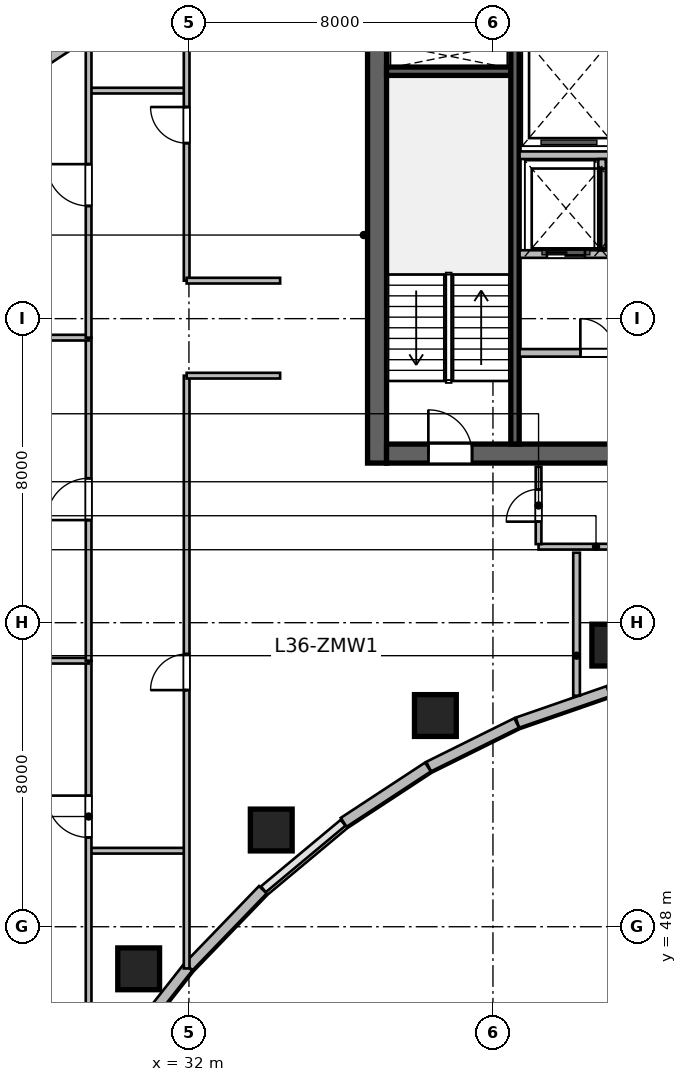
"""IFC4 building model, lengths in metres.
Left out: names, types, materials, properties, quantities, classifications, styles, units other than length and angle.
Written with IfcOpenShell. Run it as: python <this file> out.ifc"""

import sys

from ifc_helpers import new_model, si_unit, direction, frame, frame_2d, origin, origin_2d, place, context, subcontext, project, spatial, rectangle, circle, extrude, source, transform, mapped, element, fill, save


model = new_model("IFC4")
c1 = context("Model", 3, precision=1e-05, world=origin(), true_north=direction((0.0, 1.0)))
c2 = subcontext(c1, "Body", "Model", "MODEL_VIEW")
j1 = project(units=[si_unit("LENGTHUNIT", "METRE"), si_unit("PLANEANGLEUNIT", "RADIAN")], contexts=[c1])
p1 = place(None, origin())
s1 = spatial("IfcSite", under=j1, at=p1, CompositionType="ELEMENT")
p2 = place(p1, origin())
s2 = spatial("IfcBuilding", under=s1, at=p2, CompositionType="ELEMENT")
p3 = place(p2, frame((0.0, 0.0, 150.6)))
s3 = spatial("IfcBuildingStorey", under=s2, at=p3, CompositionType="ELEMENT", Elevation=150.6)
m1 = source(origin(), c2, "Body", "SweptSolid", [
    extrude(rectangle(XDim=12.0, YDim=0.5, at=frame_2d((6.0, 0.0))), origin(), (0.0, 0.0, 1.0), 3.9),
])
p4 = place(p3, frame((36.95, 60.2, 0.0), z_axis=(0.0, 0.0, 1.0), x_axis=(0.0, 1.0, 0.0)))
e1 = element("IfcWall", 1, at=p4, inside=s3, PredefinedType="SHEAR", context=c2, shape_type="MappedRepresentation", body=[
    mapped(m1, transform((0.0, 0.0, 0.0), scale=1.0)),
])
m2 = source(origin(), c2, "Body", "SweptSolid", [
    extrude(rectangle(XDim=21.6, YDim=0.5, at=frame_2d((10.8, 0.0))), origin(), (0.0, 0.0, 1.0), 3.9),
])
p5 = place(p3, frame((37.2, 60.45, 0.0), z_axis=(0.0, 0.0, 1.0), x_axis=(1.0, 0.0, 0.0)))
e2 = element("IfcWall", 2, at=p5, inside=s3, PredefinedType="SHEAR", context=c2, shape_type="MappedRepresentation", body=[
    mapped(m2, transform((0.0, 0.0, 0.0), scale=1.0)),
])
p6 = place(p5, frame((1.1, 0.0, 0.0)))
e3 = element("IfcOpeningElement", 3, at=p6, cuts=e2, PredefinedType="OPENING", context=c2, shape_type="SweptSolid", body=[
    extrude(rectangle(XDim=1.15, YDim=2.15, at=frame_2d((0.575, 1.075))), frame((0.0, 0.26, 0.0), z_axis=(0.0, -1.0, 0.0), x_axis=(1.0, 0.0, 0.0)), (0.0, 0.0, 1.0), 0.52),
])
p7 = place(p5, frame((19.5, 0.0, 0.0)))
e4 = element("IfcOpeningElement", 4, at=p7, cuts=e2, PredefinedType="OPENING", context=c2, shape_type="SweptSolid", body=[
    extrude(rectangle(XDim=0.9, YDim=2.1, at=frame_2d((0.45, 1.05))), frame((0.0, 0.26, 0.0), z_axis=(0.0, -1.0, 0.0), x_axis=(1.0, 0.0, 0.0)), (0.0, 0.0, 1.0), 0.52),
])
p8 = place(p5, frame((12.02, 0.0, 0.0)))
e5 = element("IfcOpeningElement", 5, at=p8, cuts=e2, PredefinedType="OPENING", context=c2, shape_type="SweptSolid", body=[
    extrude(rectangle(XDim=1.6, YDim=2.15, at=frame_2d((0.8, 1.075))), frame((0.0, 0.26, 0.0), z_axis=(0.0, -1.0, 0.0), x_axis=(1.0, 0.0, 0.0)), (0.0, 0.0, 1.0), 0.52),
])
m3 = source(origin(), c2, "Body", "SweptSolid", [
    extrude(rectangle(XDim=3.27, YDim=0.22, at=frame_2d((1.635, 0.0))), origin(), (0.0, 0.0, 1.0), 3.9),
])
p9 = place(p3, frame((37.2, 70.51, 0.0), z_axis=(0.0, 0.0, 1.0), x_axis=(1.0, 0.0, 0.0)))
e6 = element("IfcWall", 6, at=p9, inside=s3, PredefinedType="SHEAR", context=c2, shape_type="MappedRepresentation", body=[
    mapped(m3, transform((0.0, 0.0, 0.0), scale=1.0)),
])
m4 = source(origin(), c2, "Body", "SweptSolid", [
    extrude(rectangle(XDim=11.0, YDim=0.22, at=frame_2d((5.5, 0.0))), origin(), (0.0, 0.0, 1.0), 3.9),
])
p10 = place(p3, frame((40.58, 60.7, 0.0), z_axis=(0.0, 0.0, 1.0), x_axis=(0.0, 1.0, 0.0)))
e7 = element("IfcWall", 7, at=p10, inside=s3, PredefinedType="SHEAR", context=c2, shape_type="MappedRepresentation", body=[
    mapped(m4, transform((0.0, 0.0, 0.0), scale=1.0)),
])
m5 = source(origin(), c2, "Body", "SweptSolid", [
    extrude(circle(Radius=0.55, at=origin_2d()), origin(), (0.0, 0.0, 1.0), 3.9),
])
for number, where, z_axis, x_axis in (
    (8, (30.677, 46.892, 0.0), (0.0, 0.0, 1.0), (-0.571, 0.821, 0.0)),
    (9, (34.166, 50.545, 0.0), (0.0, 0.0, 1.0), (-0.436, 0.9, 0.0)),
    (10, (38.485, 53.558, 0.0), (0.0, 0.0, 1.0), (-0.289, 0.957, 0.0)),
    (11, (43.154, 55.411, 0.0), (0.0, 0.0, 1.0), (-0.143, 0.99, 0.0)),
):
    element("IfcColumn", number, at=place(p3, frame(where, z_axis=z_axis, x_axis=x_axis)), inside=s3, PredefinedType="COLUMN", context=c2, shape_type="MappedRepresentation", body=[
        mapped(m5, transform((0.0, 0.0, 0.0), scale=1.0)),
    ])
m6 = source(origin(), c2, "Body", "SweptSolid", [
    extrude(rectangle(XDim=2.53, YDim=0.28, at=frame_2d((1.265, 0.0))), origin(), (0.0, 0.0, 1.0), 3.65),
])
p11 = place(p3, frame((43.035, 54.198, 0.0), z_axis=(0.0, 0.0, 1.0), x_axis=(-0.944872429646, -0.327438683872, 0.0)))
e12 = element("IfcWall", 12, at=p11, inside=s3, PredefinedType="SOLIDWALL", context=c2, shape_type="MappedRepresentation", body=[
    mapped(m6, transform((0.0, 0.0, 0.0), scale=1.0)),
])
m7 = source(origin(), c2, "Body", "SweptSolid", [
    extrude(rectangle(XDim=2.584, YDim=0.28, at=frame_2d((1.292, 0.0))), origin(), (0.0, 0.0, 1.0), 3.65),
])
p12 = place(p3, frame((40.624, 53.361, 0.0), z_axis=(0.0, 0.0, 1.0), x_axis=(-0.895989792847, -0.44407464588, 0.0)))
e13 = element("IfcWall", 13, at=p12, inside=s3, PredefinedType="SOLIDWALL", context=c2, shape_type="MappedRepresentation", body=[
    mapped(m7, transform((0.0, 0.0, 0.0), scale=1.0)),
])
m8 = source(origin(), c2, "Body", "SweptSolid", [
    extrude(rectangle(XDim=2.652, YDim=0.28, at=frame_2d((1.326, 0.0))), origin(), (0.0, 0.0, 1.0), 3.65),
])
p13 = place(p3, frame((38.289, 52.202, 0.0), z_axis=(0.0, 0.0, 1.0), x_axis=(-0.836008323535, -0.54871676025, 0.0)))
e14 = element("IfcWall", 14, at=p13, inside=s3, PredefinedType="SOLIDWALL", context=c2, shape_type="MappedRepresentation", body=[
    mapped(m8, transform((0.0, 0.0, 0.0), scale=1.0)),
])
m9 = source(origin(), c2, "Body", "SweptSolid", [
    extrude(rectangle(XDim=2.812, YDim=0.28, at=frame_2d((1.406, 0.0))), origin(), (0.0, 0.0, 1.0), 3.65),
])
p14 = place(p3, frame((33.945, 48.973, 0.0), z_axis=(0.0, 0.0, 1.0), x_axis=(-0.694583668785, -0.719411931411, 0.0)))
e15 = element("IfcWall", 15, at=p14, inside=s3, PredefinedType="SOLIDWALL", context=c2, shape_type="MappedRepresentation", body=[
    mapped(m9, transform((0.0, 0.0, 0.0), scale=1.0)),
])
m10 = source(origin(), c2, "Body", "SweptSolid", [
    extrude(rectangle(XDim=2.897, YDim=0.28, at=frame_2d((1.448, 0.0))), origin(), (0.0, 0.0, 1.0), 3.65),
])
p15 = place(p3, frame((31.979, 46.936, 0.0), z_axis=(0.0, 0.0, 1.0), x_axis=(-0.618167636915, -0.786046291685, 0.0)))
e16 = element("IfcWall", 16, at=p15, inside=s3, PredefinedType="SOLIDWALL", context=c2, shape_type="MappedRepresentation", body=[
    mapped(m10, transform((0.0, 0.0, 0.0), scale=1.0)),
])
m11 = source(origin(), c2, "Body", "SweptSolid", [
    extrude(rectangle(XDim=4.501, YDim=0.28, at=frame_2d((2.25, 0.0))), origin(), (0.0, 0.0, 1.0), 3.65),
])
p16 = place(p3, frame((27.939, 70.61, 0.0), z_axis=(0.0, 0.0, 1.0), x_axis=(0.835984920737, 0.548752414391, 0.0)))
e17 = element("IfcWall", 17, at=p16, inside=s3, PredefinedType="SOLIDWALL", context=c2, shape_type="MappedRepresentation", body=[
    mapped(m11, transform((0.0, 0.0, 0.0), scale=1.0)),
])
m12 = source(origin(), c2, "Body", "SweptSolid", [
    extrude(rectangle(XDim=8.8, YDim=0.2, at=frame_2d((4.4, 0.0))), origin(), (0.0, 0.0, 1.0), 3.65),
])
p17 = place(p3, frame((40.7, 68.3, 0.0), z_axis=(0.0, 0.0, 1.0), x_axis=(1.0, 0.0, 0.0)))
e18 = element("IfcWall", 18, at=p17, inside=s3, PredefinedType="SOLIDWALL", context=c2, shape_type="MappedRepresentation", body=[
    mapped(m12, transform((0.0, 0.0, 0.0), scale=1.0)),
])
m13 = source(origin(), c2, "Body", "SweptSolid", [
    extrude(rectangle(XDim=8.02, YDim=0.2, at=frame_2d((4.01, 0.0))), origin(), (0.0, 0.0, 1.0), 3.65),
])
p18 = place(p3, frame((40.7, 63.1, 0.0), z_axis=(0.0, 0.0, 1.0), x_axis=(1.0, 0.0, 0.0)))
e19 = element("IfcWall", 19, at=p18, inside=s3, PredefinedType="SOLIDWALL", context=c2, shape_type="MappedRepresentation", body=[
    mapped(m13, transform((0.0, 0.0, 0.0), scale=1.0)),
])
p19 = place(p18, frame((1.6, 0.0, 0.0)))
e20 = element("IfcOpeningElement", 20, at=p19, cuts=e19, PredefinedType="OPENING", context=c2, shape_type="SweptSolid", body=[
    extrude(rectangle(XDim=0.9, YDim=2.1, at=frame_2d((0.45, 1.05))), frame((0.0, 0.11, 0.0), z_axis=(0.0, -1.0, 0.0), x_axis=(1.0, 0.0, 0.0)), (0.0, 0.0, 1.0), 0.22),
])
p20 = place(p18, frame((5.54, 0.0, 0.0)))
e21 = element("IfcOpeningElement", 21, at=p20, cuts=e19, PredefinedType="OPENING", context=c2, shape_type="SweptSolid", body=[
    extrude(rectangle(XDim=0.9, YDim=2.1, at=frame_2d((0.45, 1.05))), frame((0.0, 0.11, 0.0), z_axis=(0.0, -1.0, 0.0), x_axis=(1.0, 0.0, 0.0)), (0.0, 0.0, 1.0), 0.22),
])
p21 = place(p3, frame((40.7, 65.7, 0.0), z_axis=(0.0, 0.0, 1.0), x_axis=(1.0, 0.0, 0.0)))
e22 = element("IfcWall", 22, at=p21, inside=s3, PredefinedType="SOLIDWALL", context=c2, shape_type="MappedRepresentation", body=[
    mapped(m12, transform((0.0, 0.0, 0.0), scale=1.0)),
])
p22 = place(p21, frame((0.72, 0.0, 0.0)))
e23 = element("IfcOpeningElement", 23, at=p22, cuts=e22, PredefinedType="OPENING", context=c2, shape_type="SweptSolid", body=[
    extrude(rectangle(XDim=1.0, YDim=2.15, at=frame_2d((0.5, 1.075))), frame((0.0, 0.11, 0.0), z_axis=(0.0, -1.0, 0.0), x_axis=(1.0, 0.0, 0.0)), (0.0, 0.0, 1.0), 0.22),
])
p23 = place(p21, frame((2.62, 0.0, 0.0)))
e24 = element("IfcOpeningElement", 24, at=p23, cuts=e22, PredefinedType="OPENING", context=c2, shape_type="SweptSolid", body=[
    extrude(rectangle(XDim=1.0, YDim=2.15, at=frame_2d((0.5, 1.075))), frame((0.0, 0.11, 0.0), z_axis=(0.0, -1.0, 0.0), x_axis=(1.0, 0.0, 0.0)), (0.0, 0.0, 1.0), 0.22),
])
p24 = place(p21, frame((4.55, 0.0, 0.0)))
e25 = element("IfcOpeningElement", 25, at=p24, cuts=e22, PredefinedType="OPENING", context=c2, shape_type="SweptSolid", body=[
    extrude(rectangle(XDim=1.0, YDim=2.15, at=frame_2d((0.5, 1.075))), frame((0.0, 0.11, 0.0), z_axis=(0.0, -1.0, 0.0), x_axis=(1.0, 0.0, 0.0)), (0.0, 0.0, 1.0), 0.22),
])
p25 = place(p21, frame((6.55, 0.0, 0.0)))
e26 = element("IfcOpeningElement", 26, at=p25, cuts=e22, PredefinedType="OPENING", context=c2, shape_type="SweptSolid", body=[
    extrude(rectangle(XDim=1.0, YDim=2.15, at=frame_2d((0.5, 1.075))), frame((0.0, 0.11, 0.0), z_axis=(0.0, -1.0, 0.0), x_axis=(1.0, 0.0, 0.0)), (0.0, 0.0, 1.0), 0.22),
])
m14 = source(origin(), c2, "Body", "SweptSolid", [
    extrude(rectangle(XDim=2.4, YDim=0.2, at=frame_2d((1.2, 0.0))), origin(), (0.0, 0.0, 1.0), 3.65),
])
p26 = place(p3, frame((42.87, 65.8, 0.0), z_axis=(0.0, 0.0, 1.0), x_axis=(0.0, 1.0, 0.0)))
e27 = element("IfcWall", 27, at=p26, inside=s3, PredefinedType="SOLIDWALL", context=c2, shape_type="MappedRepresentation", body=[
    mapped(m14, transform((0.0, 0.0, 0.0), scale=1.0)),
])
m15 = source(origin(), c2, "Body", "SweptSolid", [
    extrude(rectangle(XDim=5.4, YDim=0.15, at=frame_2d((2.7, 0.0))), origin(), (0.0, 0.0, 1.0), 3.65),
])
p27 = place(p3, frame((41.2, 58.0, 0.0), z_axis=(0.0, 0.0, 1.0), x_axis=(1.0, 0.0, 0.0)))
e28 = element("IfcWall", 28, at=p27, inside=s3, PredefinedType="PARTITIONING", context=c2, shape_type="MappedRepresentation", body=[
    mapped(m15, transform((0.0, 0.0, 0.0), scale=1.0)),
])
p28 = place(p27, frame((2.25, 0.0, 0.0)))
e29 = element("IfcOpeningElement", 29, at=p28, cuts=e28, PredefinedType="OPENING", context=c2, shape_type="SweptSolid", body=[
    extrude(rectangle(XDim=0.9, YDim=2.08, at=frame_2d((0.45, 1.04))), frame((0.0, 0.085, 0.0), z_axis=(0.0, -1.0, 0.0), x_axis=(1.0, 0.0, 0.0)), (0.0, 0.0, 1.0), 0.17),
])
m16 = source(origin(), c2, "Body", "SweptSolid", [
    extrude(rectangle(XDim=2.033, YDim=0.15, at=frame_2d((1.016, 0.0))), origin(), (0.0, 0.0, 1.0), 3.65),
])
p29 = place(p3, frame((41.2, 58.067, 0.0), z_axis=(0.0, 0.0, 1.0), x_axis=(0.0, 1.0, 0.0)))
e30 = element("IfcWall", 30, at=p29, inside=s3, PredefinedType="PARTITIONING", context=c2, shape_type="MappedRepresentation", body=[
    mapped(m16, transform((0.0, 0.0, 0.0), scale=1.0)),
])
p30 = place(p29, frame((0.591, 0.0, 0.0)))
e31 = element("IfcOpeningElement", 31, at=p30, cuts=e30, PredefinedType="OPENING", context=c2, shape_type="SweptSolid", body=[
    extrude(rectangle(XDim=0.85, YDim=2.1, at=frame_2d((0.425, 1.05))), frame((0.0, 0.085, 0.0), z_axis=(0.0, -1.0, 0.0), x_axis=(1.0, 0.0, 0.0)), (0.0, 0.0, 1.0), 0.17),
])
m17 = source(origin(), c2, "Body", "SweptSolid", [
    extrude(rectangle(XDim=3.763, YDim=0.175, at=frame_2d((1.881, 0.0))), origin(), (0.0, 0.0, 1.0), 3.65),
])
p31 = place(p3, frame((42.2, 54.079, 0.0), z_axis=(0.0, 0.0, 1.0), x_axis=(0.0, 1.0, 0.0)))
e32 = element("IfcWall", 32, at=p31, inside=s3, PredefinedType="PARTITIONING", context=c2, shape_type="MappedRepresentation", body=[
    mapped(m17, transform((0.0, 0.0, 0.0), scale=1.0)),
])
m18 = source(origin(), c2, "Body", "SweptSolid", [
    extrude(rectangle(XDim=2.5, YDim=0.15, at=frame_2d((1.25, 0.0))), origin(), (0.0, 0.0, 1.0), 3.65),
])
for number, where, z_axis, x_axis in (
    (33, (29.4, 50.0, 0.0), (0.0, 0.0, 1.0), (1.0, 0.0, 0.0)),
    (34, (29.4, 70.0, 0.0), (0.0, 0.0, 1.0), (1.0, 0.0, 0.0)),
):
    element("IfcWall", number, at=place(p3, frame(where, z_axis=z_axis, x_axis=x_axis)), inside=s3, PredefinedType="PARTITIONING", context=c2, shape_type="MappedRepresentation", body=[
        mapped(m18, transform((0.0, 0.0, 0.0), scale=1.0)),
    ])
m19 = source(origin(), c2, "Body", "SweptSolid", [
    extrude(rectangle(XDim=11.612, YDim=0.15, at=frame_2d((5.806, 0.0))), origin(), (0.0, 0.0, 1.0), 2.942),
])
p32 = place(p3, frame((29.36, 43.388, 0.0), z_axis=(0.0, 0.0, 1.0), x_axis=(0.0, 1.0, 0.0)))
e35 = element("IfcWall", 35, at=p32, inside=s3, PredefinedType="PARTITIONING", context=c2, shape_type="MappedRepresentation", body=[
    mapped(m19, transform((0.0, 0.0, 0.0), scale=1.0)),
])
p33 = place(p32, frame((6.962, 0.0, 0.0)))
e36 = element("IfcOpeningElement", 36, at=p33, cuts=e35, PredefinedType="OPENING", context=c2, shape_type="SweptSolid", body=[
    extrude(rectangle(XDim=1.1, YDim=2.15, at=frame_2d((0.55, 1.075))), frame((0.0, 0.085, 0.0), z_axis=(0.0, -1.0, 0.0), x_axis=(1.0, 0.0, 0.0)), (0.0, 0.0, 1.0), 0.17),
])
m20 = source(origin(), c2, "Body", "SweptSolid", [
    extrude(rectangle(XDim=14.623, YDim=0.15, at=frame_2d((7.312, 0.0))), origin(), (0.0, 0.0, 1.0), 3.65),
])
p34 = place(p3, frame((14.737, 55.0, 0.0), z_axis=(0.0, 0.0, 1.0), x_axis=(1.0, 0.0, 0.0)))
e37 = element("IfcWall", 37, at=p34, inside=s3, PredefinedType="PARTITIONING", context=c2, shape_type="MappedRepresentation", body=[
    mapped(m20, transform((0.0, 0.0, 0.0), scale=1.0)),
])
m21 = source(origin(), c2, "Body", "SweptSolid", [
    extrude(rectangle(XDim=8.5, YDim=0.15, at=frame_2d((4.25, 0.0))), origin(), (0.0, 0.0, 1.0), 2.942),
])
p35 = place(p3, frame((29.36, 55.0, 0.0), z_axis=(0.0, 0.0, 1.0), x_axis=(0.0, 1.0, 0.0)))
e38 = element("IfcWall", 38, at=p35, inside=s3, PredefinedType="PARTITIONING", context=c2, shape_type="MappedRepresentation", body=[
    mapped(m21, transform((0.0, 0.0, 0.0), scale=1.0)),
])
p36 = place(p35, frame((3.7, 0.0, 0.0)))
e39 = element("IfcOpeningElement", 39, at=p36, cuts=e38, PredefinedType="OPENING", context=c2, shape_type="SweptSolid", body=[
    extrude(rectangle(XDim=1.1, YDim=2.15, at=frame_2d((0.55, 1.075))), frame((0.0, 0.085, 0.0), z_axis=(0.0, -1.0, 0.0), x_axis=(1.0, 0.0, 0.0)), (0.0, 0.0, 1.0), 0.17),
])
m22 = source(origin(), c2, "Body", "SweptSolid", [
    extrude(rectangle(XDim=8.839, YDim=0.15, at=frame_2d((4.419, 0.0))), origin(), (0.0, 0.0, 1.0), 3.65),
])
p37 = place(p3, frame((20.521, 63.5, 0.0), z_axis=(0.0, 0.0, 1.0), x_axis=(1.0, 0.0, 0.0)))
e40 = element("IfcWall", 40, at=p37, inside=s3, PredefinedType="PARTITIONING", context=c2, shape_type="MappedRepresentation", body=[
    mapped(m22, transform((0.0, 0.0, 0.0), scale=1.0)),
])
m23 = source(origin(), c2, "Body", "SweptSolid", [
    extrude(rectangle(XDim=8.031, YDim=0.15, at=frame_2d((4.015, 0.0))), origin(), (0.0, 0.0, 1.0), 3.65),
])
p38 = place(p3, frame((29.36, 63.5, 0.0), z_axis=(0.0, 0.0, 1.0), x_axis=(0.0, 1.0, 0.0)))
e41 = element("IfcWall", 41, at=p38, inside=s3, PredefinedType="PARTITIONING", context=c2, shape_type="MappedRepresentation", body=[
    mapped(m23, transform((0.0, 0.0, 0.0), scale=1.0)),
])
p39 = place(p38, frame((3.465, 0.0, 0.0)))
e42 = element("IfcOpeningElement", 42, at=p39, cuts=e41, PredefinedType="OPENING", context=c2, shape_type="SweptSolid", body=[
    extrude(rectangle(XDim=1.1, YDim=2.15, at=frame_2d((0.55, 1.075))), frame((0.0, 0.085, 0.0), z_axis=(0.0, -1.0, 0.0), x_axis=(1.0, 0.0, 0.0)), (0.0, 0.0, 1.0), 0.17),
])
m24 = source(origin(), c2, "Body", "SweptSolid", [
    extrude(rectangle(XDim=15.598, YDim=0.15, at=frame_2d((7.799, 0.0))), origin(), (0.0, 0.0, 1.0), 2.942),
])
p40 = place(p3, frame((31.94, 46.902, 0.0), z_axis=(0.0, 0.0, 1.0), x_axis=(0.0, 1.0, 0.0)))
e43 = element("IfcWall", 43, at=p40, inside=s3, PredefinedType="PARTITIONING", context=c2, shape_type="MappedRepresentation", body=[
    mapped(m24, transform((0.0, 0.0, 0.0), scale=1.0)),
])
p41 = place(p40, frame((7.324, 0.0, 0.0)))
e44 = element("IfcOpeningElement", 44, at=p41, cuts=e43, PredefinedType="OPENING", context=c2, shape_type="SweptSolid", body=[
    extrude(rectangle(XDim=0.95, YDim=2.1, at=frame_2d((0.475, 1.05))), frame((0.0, 0.085, 0.0), z_axis=(0.0, -1.0, 0.0), x_axis=(1.0, 0.0, 0.0)), (0.0, 0.0, 1.0), 0.17),
])
m25 = source(origin(), c2, "Body", "SweptSolid", [
    extrude(rectangle(XDim=2.46, YDim=0.15, at=frame_2d((1.23, 0.0))), origin(), (0.0, 0.0, 1.0), 3.65),
])
p42 = place(p3, frame((31.94, 62.5, 0.0), z_axis=(0.0, 0.0, 1.0), x_axis=(1.0, 0.0, 0.0)))
e45 = element("IfcWall", 45, at=p42, inside=s3, PredefinedType="PARTITIONING", context=c2, shape_type="MappedRepresentation", body=[
    mapped(m25, transform((0.0, 0.0, 0.0), scale=1.0)),
])
m26 = source(origin(), c2, "Body", "SweptSolid", [
    extrude(rectangle(XDim=8.187, YDim=0.15, at=frame_2d((4.093, 0.0))), origin(), (0.0, 0.0, 1.0), 3.65),
])
p43 = place(p3, frame((31.94, 65.0, 0.0), z_axis=(0.0, 0.0, 1.0), x_axis=(0.0, 1.0, 0.0)))
e46 = element("IfcWall", 46, at=p43, inside=s3, PredefinedType="PARTITIONING", context=c2, shape_type="MappedRepresentation", body=[
    mapped(m26, transform((0.0, 0.0, 0.0), scale=1.0)),
])
p44 = place(p43, frame((3.618, 0.0, 0.0)))
e47 = element("IfcOpeningElement", 47, at=p44, cuts=e46, PredefinedType="OPENING", context=c2, shape_type="SweptSolid", body=[
    extrude(rectangle(XDim=0.95, YDim=2.1, at=frame_2d((0.475, 1.05))), frame((0.0, 0.085, 0.0), z_axis=(0.0, -1.0, 0.0), x_axis=(1.0, 0.0, 0.0)), (0.0, 0.0, 1.0), 0.17),
])
p45 = place(p3, frame((31.94, 65.0, 0.0), z_axis=(0.0, 0.0, 1.0), x_axis=(1.0, 0.0, 0.0)))
e48 = element("IfcWall", 48, at=p45, inside=s3, PredefinedType="PARTITIONING", context=c2, shape_type="MappedRepresentation", body=[
    mapped(m25, transform((0.0, 0.0, 0.0), scale=1.0)),
])
m27 = source(origin(), c2, "Body", "SweptSolid", [
    extrude(rectangle(XDim=1.15, YDim=2.15, at=frame_2d((0.575, 1.075))), frame((0.0, 0.025, 0.0), z_axis=(0.0, -1.0, 0.0), x_axis=(1.0, 0.0, 0.0)), (0.0, 0.0, 1.0), 0.05),
])
p46 = place(p6, origin())
e49 = element("IfcDoor", 49, at=p46, inside=s3, OperationType="SINGLE_SWING_LEFT", PredefinedType="DOOR", context=c2, shape_type="MappedRepresentation", body=[
    mapped(m27, transform((0.0, 0.0, 0.0), scale=1.0)),
])
fill(e3, e49)
m28 = source(origin(), c2, "Body", "SweptSolid", [
    extrude(rectangle(XDim=0.9, YDim=2.1, at=frame_2d((0.45, 1.05))), frame((0.0, 0.025, 0.0), z_axis=(0.0, -1.0, 0.0), x_axis=(1.0, 0.0, 0.0)), (0.0, 0.0, 1.0), 0.05),
])
p47 = place(p19, origin())
e50 = element("IfcDoor", 50, at=p47, inside=s3, OperationType="SINGLE_SWING_LEFT", PredefinedType="DOOR", context=c2, shape_type="MappedRepresentation", body=[
    mapped(m28, transform((0.0, 0.0, 0.0), scale=1.0)),
])
fill(e20, e50)
m29 = source(origin(), c2, "Body", "SweptSolid", [
    extrude(rectangle(XDim=1.0, YDim=2.15, at=frame_2d((0.5, 1.075))), frame((0.0, 0.025, 0.0), z_axis=(0.0, -1.0, 0.0), x_axis=(1.0, 0.0, 0.0)), (0.0, 0.0, 1.0), 0.05),
])
p48 = place(p22, origin())
e51 = element("IfcDoor", 51, at=p48, inside=s3, OperationType="DOUBLE_DOOR_SLIDING", PredefinedType="DOOR", context=c2, shape_type="MappedRepresentation", body=[
    mapped(m29, transform((0.0, 0.0, 0.0), scale=1.0)),
])
fill(e23, e51)
m30 = source(origin(), c2, "Body", "SweptSolid", [
    extrude(rectangle(XDim=0.85, YDim=2.1, at=frame_2d((0.425, 1.05))), frame((0.0, 0.025, 0.0), z_axis=(0.0, -1.0, 0.0), x_axis=(1.0, 0.0, 0.0)), (0.0, 0.0, 1.0), 0.05),
])
p49 = place(p30, origin())
e52 = element("IfcDoor", 52, at=p49, inside=s3, OperationType="SINGLE_SWING_LEFT", PredefinedType="DOOR", context=c2, shape_type="MappedRepresentation", body=[
    mapped(m30, transform((0.0, 0.0, 0.0), scale=1.0)),
])
fill(e31, e52)
m31 = source(origin(), c2, "Body", "SweptSolid", [
    extrude(rectangle(XDim=1.1, YDim=2.15, at=frame_2d((0.55, 1.075))), frame((0.0, 0.025, 0.0), z_axis=(0.0, -1.0, 0.0), x_axis=(1.0, 0.0, 0.0)), (0.0, 0.0, 1.0), 0.05),
])
p50 = place(p33, origin())
e53 = element("IfcDoor", 53, at=p50, inside=s3, OperationType="SINGLE_SWING_RIGHT", PredefinedType="DOOR", context=c2, shape_type="MappedRepresentation", body=[
    mapped(m31, transform((0.0, 0.0, 0.0), scale=1.0)),
])
fill(e36, e53)
p51 = place(p36, origin())
e54 = element("IfcDoor", 54, at=p51, inside=s3, OperationType="SINGLE_SWING_LEFT", PredefinedType="DOOR", context=c2, shape_type="MappedRepresentation", body=[
    mapped(m31, transform((0.0, 0.0, 0.0), scale=1.0)),
])
fill(e39, e54)
p52 = place(p39, origin())
e55 = element("IfcDoor", 55, at=p52, inside=s3, OperationType="SINGLE_SWING_RIGHT", PredefinedType="DOOR", context=c2, shape_type="MappedRepresentation", body=[
    mapped(m31, transform((0.0, 0.0, 0.0), scale=1.0)),
])
fill(e42, e55)
m32 = source(origin(), c2, "Body", "SweptSolid", [
    extrude(rectangle(XDim=0.95, YDim=2.1, at=frame_2d((0.475, 1.05))), frame((0.0, 0.025, 0.0), z_axis=(0.0, -1.0, 0.0), x_axis=(1.0, 0.0, 0.0)), (0.0, 0.0, 1.0), 0.05),
])
p53 = place(p41, origin())
e56 = element("IfcDoor", 56, at=p53, inside=s3, OperationType="SINGLE_SWING_LEFT", PredefinedType="DOOR", context=c2, shape_type="MappedRepresentation", body=[
    mapped(m32, transform((0.0, 0.0, 0.0), scale=1.0)),
])
fill(e44, e56)
p54 = place(p44, origin())
e57 = element("IfcDoor", 57, at=p54, inside=s3, OperationType="SINGLE_SWING_RIGHT", PredefinedType="DOOR", context=c2, shape_type="MappedRepresentation", body=[
    mapped(m32, transform((0.0, 0.0, 0.0), scale=1.0)),
])
fill(e47, e57)
save(model, sys.argv[1])
